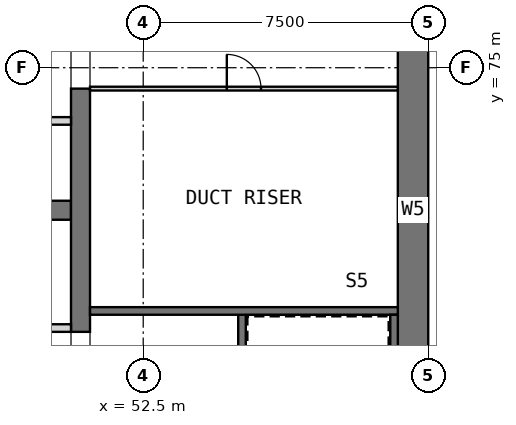
"""IFC4 building model, lengths in metres.
Left out: names, types, materials, properties, quantities, classifications, styles, units other than length and angle.
Written with IfcOpenShell. Run it as: python <this file> out.ifc"""

import sys

from ifc_helpers import new_model, si_unit, direction, frame, frame_2d, origin, place, context, subcontext, project, spatial, rectangle, extrude, element, fill, save


model = new_model("IFC4")
c1 = context("Model", 3, precision=1e-05, world=origin(), true_north=direction((0.0, 1.0)))
c2 = subcontext(c1, "Body", "Model", "MODEL_VIEW")
j1 = project(units=[si_unit("LENGTHUNIT", "METRE"), si_unit("PLANEANGLEUNIT", "RADIAN")], contexts=[c1])
p1 = place(None, origin())
s1 = spatial("IfcSite", under=j1, at=p1, CompositionType="ELEMENT")
p2 = place(p1, origin())
s2 = spatial("IfcBuilding", under=s1, at=p2, CompositionType="ELEMENT")
p3 = place(p2, frame((0.0, 0.0, 141.0)))
s3 = spatial("IfcBuildingStorey", under=s2, at=p3, CompositionType="ELEMENT", Elevation=141.0)
p4 = place(p3, frame((59.6, 60.8, 0.0), z_axis=(0.0, 0.0, 1.0), x_axis=(0.0, 1.0, 0.0)))
e1 = element("IfcWall", 1, at=p4, inside=s3, PredefinedType="SHEAR", context=c2, shape_type="SweptSolid", body=[
    extrude(rectangle(XDim=20.9, YDim=0.8, at=frame_2d((10.45, 0.0))), origin(), (0.0, 0.0, 1.0), 3.6),
])
p5 = place(p4, frame((14.7, 0.0, 0.0)))
e2 = element("IfcOpeningElement", 2, at=p5, cuts=e1, PredefinedType="OPENING", context=c2, shape_type="SweptSolid", body=[
    extrude(rectangle(XDim=1.8, YDim=2.1, at=frame_2d((0.9, 1.05))), frame((0.0, 0.41, 0.0), z_axis=(0.0, -1.0, 0.0), x_axis=(1.0, 0.0, 0.0)), (0.0, 0.0, 1.0), 0.82),
])
p6 = place(p3, frame((35.0, 71.25, 0.0), z_axis=(0.0, 0.0, 1.0), x_axis=(1.0, 0.0, 0.0)))
e3 = element("IfcWall", 3, at=p6, inside=s3, PredefinedType="SHEAR", context=c2, shape_type="SweptSolid", body=[
    extrude(rectangle(XDim=15.6, YDim=0.5, at=frame_2d((7.8, 0.0))), origin(), (0.0, 0.0, 1.0), 3.6),
])
p7 = place(p3, frame((50.85, 68.05, 0.0), z_axis=(0.0, 0.0, 1.0), x_axis=(0.0, 1.0, 0.0)))
e4 = element("IfcWall", 4, at=p7, inside=s3, PredefinedType="SHEAR", context=c2, shape_type="SweptSolid", body=[
    extrude(rectangle(XDim=6.4, YDim=0.5, at=frame_2d((3.2, 0.0))), origin(), (0.0, 0.0, 1.0), 3.6),
])
p8 = place(p3, frame((35.0, 68.15, 0.0), z_axis=(0.0, 0.0, 1.0), x_axis=(1.0, 0.0, 0.0)))
e5 = element("IfcWall", 5, at=p8, inside=s3, PredefinedType="PARTITIONING", context=c2, shape_type="SweptSolid", body=[
    extrude(rectangle(XDim=15.6, YDim=0.2, at=frame_2d((7.8, 0.0))), origin(), (0.0, 0.0, 1.0), 3.35),
])
p9 = place(p8, frame((3.55, 0.0, 0.0)))
e6 = element("IfcOpeningElement", 6, at=p9, cuts=e5, PredefinedType="OPENING", context=c2, shape_type="SweptSolid", body=[
    extrude(rectangle(XDim=0.9, YDim=2.1, at=frame_2d((0.45, 1.05))), frame((0.0, 0.11, 0.0), z_axis=(0.0, -1.0, 0.0), x_axis=(1.0, 0.0, 0.0)), (0.0, 0.0, 1.0), 0.22),
])
p10 = place(p8, frame((11.35, 0.0, 0.0)))
e7 = element("IfcOpeningElement", 7, at=p10, cuts=e5, PredefinedType="OPENING", context=c2, shape_type="SweptSolid", body=[
    extrude(rectangle(XDim=0.9, YDim=2.1, at=frame_2d((0.45, 1.05))), frame((0.0, 0.11, 0.0), z_axis=(0.0, -1.0, 0.0), x_axis=(1.0, 0.0, 0.0)), (0.0, 0.0, 1.0), 0.22),
])
p11 = place(p3, frame((35.0, 73.6, 0.0), z_axis=(0.0, 0.0, 1.0), x_axis=(1.0, 0.0, 0.0)))
e8 = element("IfcWall", 8, at=p11, inside=s3, PredefinedType="SOLIDWALL", context=c2, shape_type="SweptSolid", body=[
    extrude(rectangle(XDim=15.6, YDim=0.2, at=frame_2d((7.8, 0.0))), origin(), (0.0, 0.0, 1.0), 3.6),
])
p12 = place(p11, frame((0.75, 0.0, 0.0)))
e9 = element("IfcOpeningElement", 9, at=p12, cuts=e8, PredefinedType="OPENING", context=c2, shape_type="SweptSolid", body=[
    extrude(rectangle(XDim=1.1, YDim=2.1, at=frame_2d((0.55, 1.05))), frame((0.0, 0.11, 0.0), z_axis=(0.0, -1.0, 0.0), x_axis=(1.0, 0.0, 0.0)), (0.0, 0.0, 1.0), 0.22),
])
p13 = place(p11, frame((3.35, 0.0, 0.0)))
e10 = element("IfcOpeningElement", 10, at=p13, cuts=e8, PredefinedType="OPENING", context=c2, shape_type="SweptSolid", body=[
    extrude(rectangle(XDim=1.1, YDim=2.1, at=frame_2d((0.55, 1.05))), frame((0.0, 0.11, 0.0), z_axis=(0.0, -1.0, 0.0), x_axis=(1.0, 0.0, 0.0)), (0.0, 0.0, 1.0), 0.22),
])
p14 = place(p11, frame((5.95, 0.0, 0.0)))
e11 = element("IfcOpeningElement", 11, at=p14, cuts=e8, PredefinedType="OPENING", context=c2, shape_type="SweptSolid", body=[
    extrude(rectangle(XDim=1.1, YDim=2.1, at=frame_2d((0.55, 1.05))), frame((0.0, 0.11, 0.0), z_axis=(0.0, -1.0, 0.0), x_axis=(1.0, 0.0, 0.0)), (0.0, 0.0, 1.0), 0.22),
])
p15 = place(p11, frame((8.55, 0.0, 0.0)))
e12 = element("IfcOpeningElement", 12, at=p15, cuts=e8, PredefinedType="OPENING", context=c2, shape_type="SweptSolid", body=[
    extrude(rectangle(XDim=1.1, YDim=2.1, at=frame_2d((0.55, 1.05))), frame((0.0, 0.11, 0.0), z_axis=(0.0, -1.0, 0.0), x_axis=(1.0, 0.0, 0.0)), (0.0, 0.0, 1.0), 0.22),
])
p16 = place(p11, frame((11.15, 0.0, 0.0)))
e13 = element("IfcOpeningElement", 13, at=p16, cuts=e8, PredefinedType="OPENING", context=c2, shape_type="SweptSolid", body=[
    extrude(rectangle(XDim=1.1, YDim=2.1, at=frame_2d((0.55, 1.05))), frame((0.0, 0.11, 0.0), z_axis=(0.0, -1.0, 0.0), x_axis=(1.0, 0.0, 0.0)), (0.0, 0.0, 1.0), 0.22),
])
p17 = place(p11, frame((13.75, 0.0, 0.0)))
e14 = element("IfcOpeningElement", 14, at=p17, cuts=e8, PredefinedType="OPENING", context=c2, shape_type="SweptSolid", body=[
    extrude(rectangle(XDim=1.1, YDim=2.1, at=frame_2d((0.55, 1.05))), frame((0.0, 0.11, 0.0), z_axis=(0.0, -1.0, 0.0), x_axis=(1.0, 0.0, 0.0)), (0.0, 0.0, 1.0), 0.22),
])
p18 = place(p3, frame((55.1, 60.8, 0.0), z_axis=(0.0, 0.0, 1.0), x_axis=(0.0, 1.0, 0.0)))
e15 = element("IfcWall", 15, at=p18, inside=s3, PredefinedType="SOLIDWALL", context=c2, shape_type="SweptSolid", body=[
    extrude(rectangle(XDim=7.8, YDim=0.2, at=frame_2d((3.9, 0.0))), origin(), (0.0, 0.0, 1.0), 3.35),
])
p19 = place(p3, frame((51.1, 68.6, 0.0), z_axis=(0.0, 0.0, 1.0), x_axis=(1.0, 0.0, 0.0)))
e16 = element("IfcWall", 16, at=p19, inside=s3, PredefinedType="SOLIDWALL", context=c2, shape_type="SweptSolid", body=[
    extrude(rectangle(XDim=8.1, YDim=0.2, at=frame_2d((4.05, 0.0))), origin(), (0.0, 0.0, 1.0), 3.35),
])
p20 = place(p3, frame((59.1, 60.8, 0.0), z_axis=(0.0, 0.0, 1.0), x_axis=(0.0, 1.0, 0.0)))
e17 = element("IfcWall", 17, at=p20, inside=s3, PredefinedType="SOLIDWALL", context=c2, shape_type="SweptSolid", body=[
    extrude(rectangle(XDim=7.7, YDim=0.2, at=frame_2d((3.85, 0.0))), origin(), (0.0, 0.0, 1.0), 3.35),
])
p21 = place(p3, frame((51.1, 74.45, 0.0), z_axis=(0.0, 0.0, 1.0), x_axis=(1.0, 0.0, 0.0)))
e18 = element("IfcWall", 18, at=p21, inside=s3, PredefinedType="PARTITIONING", context=c2, shape_type="SweptSolid", body=[
    extrude(rectangle(XDim=8.1, YDim=0.1, at=frame_2d((4.05, 0.0))), origin(), (0.0, 0.0, 1.0), 3.35),
])
p22 = place(p21, frame((3.6, 0.0, 0.0)))
e19 = element("IfcOpeningElement", 19, at=p22, cuts=e18, PredefinedType="OPENING", context=c2, shape_type="SweptSolid", body=[
    extrude(rectangle(XDim=0.9, YDim=2.1, at=frame_2d((0.45, 1.05))), frame((0.0, 0.06, 0.0), z_axis=(0.0, -1.0, 0.0), x_axis=(1.0, 0.0, 0.0)), (0.0, 0.0, 1.0), 0.12),
])
p23 = place(p22, origin())
e20 = element("IfcDoor", 20, at=p23, inside=s3, OperationType="SINGLE_SWING_RIGHT", PredefinedType="DOOR", context=c2, shape_type="SweptSolid", body=[
    extrude(rectangle(XDim=0.9, YDim=2.1, at=frame_2d((0.45, 1.05))), frame((0.0, 0.025, 0.0), z_axis=(0.0, -1.0, 0.0), x_axis=(1.0, 0.0, 0.0)), (0.0, 0.0, 1.0), 0.05),
])
fill(e19, e20)
save(model, sys.argv[1])
